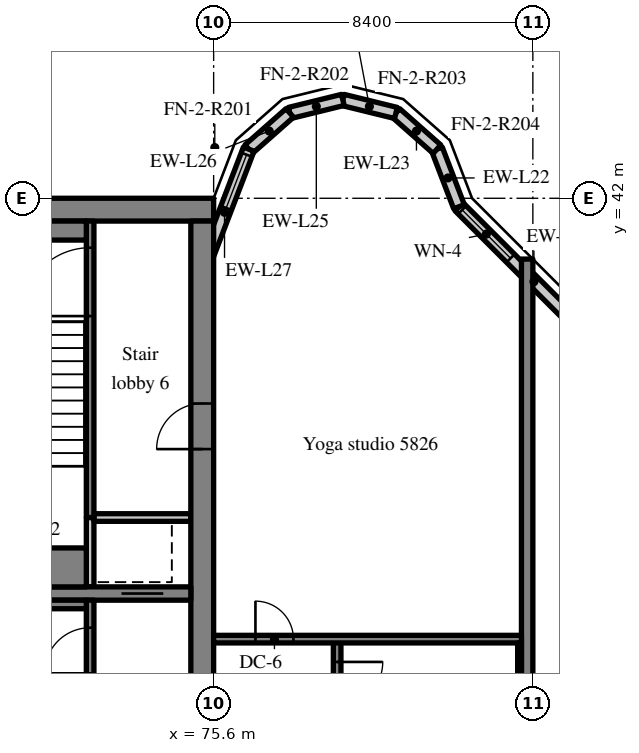
"""IFC4 building model, lengths in metres.
Left out: names, types, materials, properties, quantities, classifications, styles, units other than length and angle.
Written with IfcOpenShell. Run it as: python <this file> out.ifc"""

import sys

from ifc_helpers import new_model, si_unit, direction, frame, frame_2d, origin, place, context, subcontext, project, spatial, rectangle, extrude, source, transform, mapped, element, fill, save


model = new_model("IFC4")
c1 = context("Model", 3, precision=1e-05, world=origin(), true_north=direction((0.0, 1.0)))
c2 = subcontext(c1, "Body", "Model", "MODEL_VIEW")
j1 = project(units=[si_unit("LENGTHUNIT", "METRE"), si_unit("PLANEANGLEUNIT", "RADIAN")], contexts=[c1])
p1 = place(None, origin())
s1 = spatial("IfcSite", under=j1, at=p1, CompositionType="ELEMENT")
p2 = place(p1, origin())
s2 = spatial("IfcBuilding", under=s1, at=p2, CompositionType="ELEMENT")
p3 = place(p2, frame((0.0, 0.0, 241.3)))
s3 = spatial("IfcBuildingStorey", under=s2, at=p3, CompositionType="ELEMENT", Elevation=241.3)
m1 = source(origin(), c2, "Body", "SweptSolid", [
    extrude(rectangle(XDim=50.4, YDim=0.6, at=frame_2d((25.2, 0.0))), origin(), (0.0, 0.0, 1.0), 3.62),
])
p4 = place(p3, frame((25.2, 41.7, 0.0), z_axis=(0.0, 0.0, 1.0), x_axis=(1.0, 0.0, 0.0)))
e1 = element("IfcWall", 1, at=p4, inside=s3, PredefinedType="SHEAR", context=c2, shape_type="MappedRepresentation", body=[
    mapped(m1, transform((0.0, 0.0, 0.0), scale=1.0)),
])
m2 = source(origin(), c2, "Body", "SweptSolid", [
    extrude(rectangle(XDim=18.8, YDim=0.6, at=frame_2d((9.4, 0.0))), origin(), (0.0, 0.0, 1.0), 3.62),
])
p5 = place(p3, frame((75.3, 22.6, 0.0), z_axis=(0.0, 0.0, 1.0), x_axis=(0.0, 1.0, 0.0)))
e2 = element("IfcWall", 2, at=p5, inside=s3, PredefinedType="SHEAR", context=c2, shape_type="MappedRepresentation", body=[
    mapped(m2, transform((0.0, 0.0, 0.0), scale=1.0)),
])
m3 = source(origin(), c2, "Body", "SweptSolid", [
    extrude(rectangle(XDim=1.2, YDim=2.1, at=frame_2d((0.6, 1.05))), frame((0.0, 0.31, 0.0), z_axis=(0.0, -1.0, 0.0), x_axis=(1.0, 0.0, 0.0)), (0.0, 0.0, 1.0), 0.62),
])
p6 = place(p5, frame((12.8, 0.0, 0.0)))
e3 = element("IfcOpeningElement", 3, at=p6, cuts=e2, PredefinedType="OPENING", context=c2, shape_type="MappedRepresentation", body=[
    mapped(m3, transform((0.0, 0.0, 0.0), scale=1.0)),
])
m4 = source(origin(), c2, "Body", "SweptSolid", [
    extrude(rectangle(XDim=7.625, YDim=0.35, at=frame_2d((3.812, 0.0))), origin(), (0.0, 0.0, 1.0), 3.62),
])
p7 = place(p3, frame((67.375, 31.6, 0.0), z_axis=(0.0, 0.0, 1.0), x_axis=(1.0, 0.0, 0.0)))
e4 = element("IfcWall", 4, at=p7, inside=s3, PredefinedType="SHEAR", context=c2, shape_type="MappedRepresentation", body=[
    mapped(m4, transform((0.0, 0.0, 0.0), scale=1.0)),
])
m5 = source(origin(), c2, "Body", "SweptSolid", [
    extrude(rectangle(XDim=1.1, YDim=2.1, at=frame_2d((0.55, 1.05))), frame((0.0, 0.185, 0.0), z_axis=(0.0, -1.0, 0.0), x_axis=(1.0, 0.0, 0.0)), (0.0, 0.0, 1.0), 0.37),
])
p8 = place(p7, frame((5.8, 0.0, 0.0)))
e5 = element("IfcOpeningElement", 5, at=p8, cuts=e4, PredefinedType="OPENING", context=c2, shape_type="MappedRepresentation", body=[
    mapped(m5, transform((0.0, 0.0, 0.0), scale=1.0)),
])
m6 = source(origin(), c2, "Body", "SweptSolid", [
    extrude(rectangle(XDim=18.4, YDim=0.3, at=frame_2d((9.2, 0.0))), origin(), (0.0, 0.0, 1.0), 3.62),
])
p9 = place(p3, frame((83.85, 22.0, 0.0), z_axis=(0.0, 0.0, 1.0), x_axis=(0.0, 1.0, 0.0)))
e6 = element("IfcWall", 6, at=p9, inside=s3, PredefinedType="SHEAR", context=c2, shape_type="MappedRepresentation", body=[
    mapped(m6, transform((0.0, 0.0, 0.0), scale=1.0)),
])
m7 = source(origin(), c2, "Body", "SweptSolid", [
    extrude(rectangle(XDim=5.576, YDim=0.3, at=frame_2d((2.788, 0.0))), origin(), (0.0, 0.0, 1.0), 3.62),
])
p10 = place(p3, frame((86.0, 37.834, 0.0), z_axis=(0.0, 0.0, 1.0), x_axis=(-0.707106781187, 0.707106781187, 0.0)))
e7 = element("IfcWall", 7, at=p10, inside=s3, PredefinedType="SOLIDWALL", context=c2, shape_type="MappedRepresentation", body=[
    mapped(m7, transform((0.0, 0.0, 0.0), scale=1.0)),
])
m8 = source(origin(), c2, "Body", "SweptSolid", [
    extrude(rectangle(XDim=1.8, YDim=1.5, at=frame_2d((0.9, 0.75))), frame((0.0, 0.16, 0.0), z_axis=(0.0, -1.0, 0.0), x_axis=(1.0, 0.0, 0.0)), (0.0, 0.0, 1.0), 0.32),
])
p11 = place(p10, frame((3.658, 0.0, 0.9)))
e8 = element("IfcOpeningElement", 8, at=p11, cuts=e7, PredefinedType="OPENING", context=c2, shape_type="MappedRepresentation", body=[
    mapped(m8, transform((0.0, 0.0, 0.0), scale=1.0)),
])
m9 = source(origin(), c2, "Body", "SweptSolid", [
    extrude(rectangle(XDim=1.622, YDim=0.3, at=frame_2d((0.811, 0.0))), origin(), (0.0, 0.0, 1.0), 3.62),
])
p12 = place(p3, frame((82.057, 41.777, 0.0), z_axis=(0.0, 0.0, 1.0), x_axis=(-0.357778527068, 0.933806471154, 0.0)))
e9 = element("IfcWall", 9, at=p12, inside=s3, PredefinedType="SOLIDWALL", context=c2, shape_type="MappedRepresentation", body=[
    mapped(m9, transform((0.0, 0.0, 0.0), scale=1.0)),
])
m10 = source(origin(), c2, "Body", "SweptSolid", [
    extrude(rectangle(XDim=1.44, YDim=0.3, at=frame_2d((0.72, 0.0))), origin(), (0.0, 0.0, 1.0), 3.62),
])
p13 = place(p3, frame((81.477, 43.292, 0.0), z_axis=(0.0, 0.0, 1.0), x_axis=(-0.74957555648, 0.661918790432, 0.0)))
e10 = element("IfcWall", 10, at=p13, inside=s3, PredefinedType="SOLIDWALL", context=c2, shape_type="MappedRepresentation", body=[
    mapped(m10, transform((0.0, 0.0, 0.0), scale=1.0)),
])
m11 = source(origin(), c2, "Body", "SweptSolid", [
    extrude(rectangle(XDim=1.439, YDim=0.3, at=frame_2d((0.719, 0.0))), origin(), (0.0, 0.0, 1.0), 3.62),
])
for number, where, z_axis, x_axis in (
    (11, (80.397, 44.245, 0.0), (0.0, 0.0, 1.0), (-0.971, 0.238, 0.0)),
    (12, (79.0, 44.588, 0.0), (0.0, 0.0, 1.0), (-0.971, -0.238, 0.0)),
):
    element("IfcWall", number, at=place(p3, frame(where, z_axis=z_axis, x_axis=x_axis)), inside=s3, PredefinedType="SOLIDWALL", context=c2, shape_type="MappedRepresentation", body=[
        mapped(m11, transform((0.0, 0.0, 0.0), scale=1.0)),
    ])
p14 = place(p3, frame((77.603, 44.245, 0.0), z_axis=(0.0, 0.0, 1.0), x_axis=(-0.74957555648, -0.661918790432, 0.0)))
e13 = element("IfcWall", 13, at=p14, inside=s3, PredefinedType="SOLIDWALL", context=c2, shape_type="MappedRepresentation", body=[
    mapped(m10, transform((0.0, 0.0, 0.0), scale=1.0)),
])
m12 = source(origin(), c2, "Body", "SweptSolid", [
    extrude(rectangle(XDim=3.559, YDim=0.3, at=frame_2d((1.78, 0.0))), origin(), (0.0, 0.0, 1.0), 3.62),
])
p15 = place(p3, frame((76.523, 43.292, 0.0), z_axis=(0.0, 0.0, 1.0), x_axis=(-0.35779745313, -0.933799219604, 0.0)))
e14 = element("IfcWall", 14, at=p15, inside=s3, PredefinedType="SOLIDWALL", context=c2, shape_type="MappedRepresentation", body=[
    mapped(m12, transform((0.0, 0.0, 0.0), scale=1.0)),
])
m13 = source(origin(), c2, "Body", "SweptSolid", [
    extrude(rectangle(XDim=1.5, YDim=2.0, at=frame_2d((0.75, 1.0))), frame((0.0, 0.16, 0.0), z_axis=(0.0, -1.0, 0.0), x_axis=(1.0, 0.0, 0.0)), (0.0, 0.0, 1.0), 0.32),
])
p16 = place(p15, frame((0.156, 0.0, 0.9)))
e15 = element("IfcOpeningElement", 15, at=p16, cuts=e14, PredefinedType="OPENING", context=c2, shape_type="MappedRepresentation", body=[
    mapped(m13, transform((0.0, 0.0, 0.0), scale=1.0)),
])
m14 = source(origin(), c2, "Body", "SweptSolid", [
    extrude(rectangle(XDim=8.825, YDim=0.2, at=frame_2d((4.413, 0.0))), origin(), (0.0, 0.0, 1.0), 3.62),
])
p17 = place(p3, frame((72.35, 22.6, 0.0), z_axis=(0.0, 0.0, 1.0), x_axis=(0.0, 1.0, 0.0)))
e16 = element("IfcWall", 16, at=p17, inside=s3, PredefinedType="SOLIDWALL", context=c2, shape_type="MappedRepresentation", body=[
    mapped(m14, transform((0.0, 0.0, 0.0), scale=1.0)),
])
m15 = source(origin(), c2, "Body", "SweptSolid", [
    extrude(rectangle(XDim=1.2, YDim=2.1, at=frame_2d((0.6, 1.05))), frame((0.0, 0.11, 0.0), z_axis=(0.0, -1.0, 0.0), x_axis=(1.0, 0.0, 0.0)), (0.0, 0.0, 1.0), 0.22),
])
p18 = place(p17, frame((6.9, 0.0, 0.0)))
e17 = element("IfcOpeningElement", 17, at=p18, cuts=e16, PredefinedType="OPENING", context=c2, shape_type="MappedRepresentation", body=[
    mapped(m15, transform((0.0, 0.0, 0.0), scale=1.0)),
])
m16 = source(origin(), c2, "Body", "SweptSolid", [
    extrude(rectangle(XDim=1.825, YDim=0.2, at=frame_2d((0.913, 0.0))), origin(), (0.0, 0.0, 1.0), 3.62),
])
p19 = place(p3, frame((72.35, 31.775, 0.0), z_axis=(0.0, 0.0, 1.0), x_axis=(0.0, 1.0, 0.0)))
e18 = element("IfcWall", 18, at=p19, inside=s3, PredefinedType="SOLIDWALL", context=c2, shape_type="MappedRepresentation", body=[
    mapped(m16, transform((0.0, 0.0, 0.0), scale=1.0)),
])
m17 = source(origin(), c2, "Body", "SweptSolid", [
    extrude(rectangle(XDim=2.55, YDim=0.2, at=frame_2d((1.275, 0.0))), origin(), (0.0, 0.0, 1.0), 3.62),
])
p20 = place(p3, frame((72.45, 33.6, 0.0), z_axis=(0.0, 0.0, 1.0), x_axis=(1.0, 0.0, 0.0)))
e19 = element("IfcWall", 19, at=p20, inside=s3, PredefinedType="SOLIDWALL", context=c2, shape_type="MappedRepresentation", body=[
    mapped(m17, transform((0.0, 0.0, 0.0), scale=1.0)),
])
m18 = source(origin(), c2, "Body", "SweptSolid", [
    extrude(rectangle(XDim=7.8, YDim=0.2, at=frame_2d((3.9, 0.0))), origin(), (0.0, 0.0, 1.0), 3.62),
])
p21 = place(p3, frame((72.35, 33.6, 0.0), z_axis=(0.0, 0.0, 1.0), x_axis=(0.0, 1.0, 0.0)))
e20 = element("IfcWall", 20, at=p21, inside=s3, PredefinedType="SOLIDWALL", context=c2, shape_type="MappedRepresentation", body=[
    mapped(m18, transform((0.0, 0.0, 0.0), scale=1.0)),
])
m19 = source(origin(), c2, "Body", "SweptSolid", [
    extrude(rectangle(XDim=1.8, YDim=2.1, at=frame_2d((0.9, 1.05))), frame((0.0, 0.11, 0.0), z_axis=(0.0, -1.0, 0.0), x_axis=(1.0, 0.0, 0.0)), (0.0, 0.0, 1.0), 0.22),
])
p22 = place(p21, frame((5.3, 0.0, 0.0)))
e21 = element("IfcOpeningElement", 21, at=p22, cuts=e20, PredefinedType="OPENING", context=c2, shape_type="MappedRepresentation", body=[
    mapped(m19, transform((0.0, 0.0, 0.0), scale=1.0)),
])
m20 = source(origin(), c2, "Body", "SweptSolid", [
    extrude(rectangle(XDim=8.3, YDim=0.2, at=frame_2d((4.15, 0.0))), origin(), (0.0, 0.0, 1.0), 3.62),
])
p23 = place(p3, frame((78.85, 22.1, 0.0), z_axis=(0.0, 0.0, 1.0), x_axis=(0.0, 1.0, 0.0)))
e22 = element("IfcWall", 22, at=p23, inside=s3, PredefinedType="SOLIDWALL", context=c2, shape_type="MappedRepresentation", body=[
    mapped(m20, transform((0.0, 0.0, 0.0), scale=1.0)),
])
p24 = place(p23, frame((6.5, 0.0, 0.0)))
e23 = element("IfcOpeningElement", 23, at=p24, cuts=e22, PredefinedType="OPENING", context=c2, shape_type="MappedRepresentation", body=[
    mapped(m15, transform((0.0, 0.0, 0.0), scale=1.0)),
])
m21 = source(origin(), c2, "Body", "SweptSolid", [
    extrude(rectangle(XDim=8.1, YDim=0.2, at=frame_2d((4.05, 0.0))), origin(), (0.0, 0.0, 1.0), 3.62),
])
p25 = place(p3, frame((83.7, 30.4, 0.0), z_axis=(0.0, 0.0, 1.0), x_axis=(-1.0, 0.0, 0.0)))
e24 = element("IfcWall", 24, at=p25, inside=s3, PredefinedType="SOLIDWALL", context=c2, shape_type="MappedRepresentation", body=[
    mapped(m21, transform((0.0, 0.0, 0.0), scale=1.0)),
])
m22 = source(origin(), c2, "Body", "SweptSolid", [
    extrude(rectangle(XDim=1.0, YDim=2.1, at=frame_2d((0.5, 1.05))), frame((0.0, 0.11, 0.0), z_axis=(0.0, -1.0, 0.0), x_axis=(1.0, 0.0, 0.0)), (0.0, 0.0, 1.0), 0.22),
])
p26 = place(p25, frame((6.0, 0.0, 0.0)))
e25 = element("IfcOpeningElement", 25, at=p26, cuts=e24, PredefinedType="OPENING", context=c2, shape_type="MappedRepresentation", body=[
    mapped(m22, transform((0.0, 0.0, 0.0), scale=1.0)),
])
m23 = source(origin(), c2, "Body", "SweptSolid", [
    extrude(rectangle(XDim=4.875, YDim=0.225, at=frame_2d((2.438, 0.0))), origin(), (0.0, 0.0, 1.0), 3.62),
])
p27 = place(p3, frame((67.375, 31.312, 0.0), z_axis=(0.0, 0.0, 1.0), x_axis=(1.0, 0.0, 0.0)))
e26 = element("IfcWall", 26, at=p27, inside=s3, PredefinedType="SOLIDWALL", context=c2, shape_type="MappedRepresentation", body=[
    mapped(m23, transform((0.0, 0.0, 0.0), scale=1.0)),
])
m24 = source(origin(), c2, "Body", "SweptSolid", [
    extrude(rectangle(XDim=4.875, YDim=0.5, at=frame_2d((2.438, 0.0))), origin(), (0.0, 0.0, 1.0), 3.62),
])
p28 = place(p3, frame((67.375, 41.15, 0.0), z_axis=(0.0, 0.0, 1.0), x_axis=(1.0, 0.0, 0.0)))
e27 = element("IfcWall", 27, at=p28, inside=s3, PredefinedType="SOLIDWALL", context=c2, shape_type="MappedRepresentation", body=[
    mapped(m24, transform((0.0, 0.0, 0.0), scale=1.0)),
])
m25 = source(origin(), c2, "Body", "SweptSolid", [
    extrude(rectangle(XDim=4.875, YDim=1.025, at=frame_2d((2.438, 0.0))), origin(), (0.0, 0.0, 1.0), 3.62),
])
p29 = place(p3, frame((67.375, 32.287, 0.0), z_axis=(0.0, 0.0, 1.0), x_axis=(1.0, 0.0, 0.0)))
e28 = element("IfcWall", 28, at=p29, inside=s3, PredefinedType="SOLIDWALL", context=c2, shape_type="MappedRepresentation", body=[
    mapped(m25, transform((0.0, 0.0, 0.0), scale=1.0)),
])
m26 = source(origin(), c2, "Body", "SweptSolid", [
    extrude(rectangle(XDim=8.1, YDim=0.1, at=frame_2d((4.05, 0.0))), origin(), (0.0, 0.0, 1.0), 3.62),
])
p30 = place(p3, frame((83.65, 22.2, 0.0), z_axis=(0.0, 0.0, 1.0), x_axis=(0.0, 1.0, 0.0)))
e29 = element("IfcWall", 29, at=p30, inside=s3, PredefinedType="SOLIDWALL", context=c2, shape_type="MappedRepresentation", body=[
    mapped(m26, transform((0.0, 0.0, 0.0), scale=1.0)),
])
m27 = source(origin(), c2, "Body", "SweptSolid", [
    extrude(rectangle(XDim=1.8, YDim=1.5, at=frame_2d((0.9, 0.75))), frame((0.0, 0.03, 0.0), z_axis=(0.0, -1.0, 0.0), x_axis=(1.0, 0.0, 0.0)), (0.0, 0.0, 1.0), 0.06),
])
p31 = place(p11, origin())
e30 = element("IfcWindow", 30, at=p31, inside=s3, PartitioningType="SINGLE_PANEL", PredefinedType="WINDOW", context=c2, shape_type="MappedRepresentation", body=[
    mapped(m27, transform((0.0, 0.0, 0.0), scale=1.0)),
])
fill(e8, e30)
m28 = source(origin(), c2, "Body", "SweptSolid", [
    extrude(rectangle(XDim=1.5, YDim=2.0, at=frame_2d((0.75, 1.0))), frame((0.0, 0.03, 0.0), z_axis=(0.0, -1.0, 0.0), x_axis=(1.0, 0.0, 0.0)), (0.0, 0.0, 1.0), 0.06),
])
p32 = place(p16, origin())
e31 = element("IfcWindow", 31, at=p32, inside=s3, PartitioningType="SINGLE_PANEL", PredefinedType="WINDOW", context=c2, shape_type="MappedRepresentation", body=[
    mapped(m28, transform((0.0, 0.0, 0.0), scale=1.0)),
])
fill(e15, e31)
m29 = source(origin(), c2, "Body", "SweptSolid", [
    extrude(rectangle(XDim=1.2, YDim=2.1, at=frame_2d((0.6, 1.05))), frame((0.0, 0.025, 0.0), z_axis=(0.0, -1.0, 0.0), x_axis=(1.0, 0.0, 0.0)), (0.0, 0.0, 1.0), 0.05),
])
p33 = place(p18, origin())
e32 = element("IfcDoor", 32, at=p33, inside=s3, OperationType="SINGLE_SWING_LEFT", PredefinedType="DOOR", context=c2, shape_type="MappedRepresentation", body=[
    mapped(m29, transform((0.0, 0.0, 0.0), scale=1.0)),
])
fill(e17, e32)
m30 = source(origin(), c2, "Body", "SweptSolid", [
    extrude(rectangle(XDim=1.1, YDim=2.1, at=frame_2d((0.55, 1.05))), frame((0.0, 0.025, 0.0), z_axis=(0.0, -1.0, 0.0), x_axis=(1.0, 0.0, 0.0)), (0.0, 0.0, 1.0), 0.05),
])
p34 = place(p8, origin())
e33 = element("IfcDoor", 33, at=p34, inside=s3, OperationType="SLIDING_TO_RIGHT", PredefinedType="DOOR", context=c2, shape_type="MappedRepresentation", body=[
    mapped(m30, transform((0.0, 0.0, 0.0), scale=1.0)),
])
fill(e5, e33)
m31 = source(origin(), c2, "Body", "SweptSolid", [
    extrude(rectangle(XDim=1.8, YDim=2.1, at=frame_2d((0.9, 1.05))), frame((0.0, 0.025, 0.0), z_axis=(0.0, -1.0, 0.0), x_axis=(1.0, 0.0, 0.0)), (0.0, 0.0, 1.0), 0.05),
])
p35 = place(p22, origin())
e34 = element("IfcDoor", 34, at=p35, inside=s3, OperationType="SINGLE_SWING_LEFT", PredefinedType="DOOR", context=c2, shape_type="MappedRepresentation", body=[
    mapped(m31, transform((0.0, 0.0, 0.0), scale=1.0)),
])
fill(e21, e34)
p36 = place(p6, origin())
e35 = element("IfcDoor", 35, at=p36, inside=s3, OperationType="SINGLE_SWING_LEFT", PredefinedType="DOOR", context=c2, shape_type="MappedRepresentation", body=[
    mapped(m29, transform((0.0, 0.0, 0.0), scale=1.0)),
])
fill(e3, e35)
p37 = place(p24, origin())
e36 = element("IfcDoor", 36, at=p37, inside=s3, OperationType="SINGLE_SWING_RIGHT", PredefinedType="DOOR", context=c2, shape_type="MappedRepresentation", body=[
    mapped(m29, transform((0.0, 0.0, 0.0), scale=1.0)),
])
fill(e23, e36)
m32 = source(origin(), c2, "Body", "SweptSolid", [
    extrude(rectangle(XDim=1.0, YDim=2.1, at=frame_2d((0.5, 1.05))), frame((0.0, 0.025, 0.0), z_axis=(0.0, -1.0, 0.0), x_axis=(1.0, 0.0, 0.0)), (0.0, 0.0, 1.0), 0.05),
])
p38 = place(p26, origin())
e37 = element("IfcDoor", 37, at=p38, inside=s3, OperationType="SINGLE_SWING_RIGHT", PredefinedType="DOOR", context=c2, shape_type="MappedRepresentation", body=[
    mapped(m32, transform((0.0, 0.0, 0.0), scale=1.0)),
])
fill(e25, e37)
save(model, sys.argv[1])
